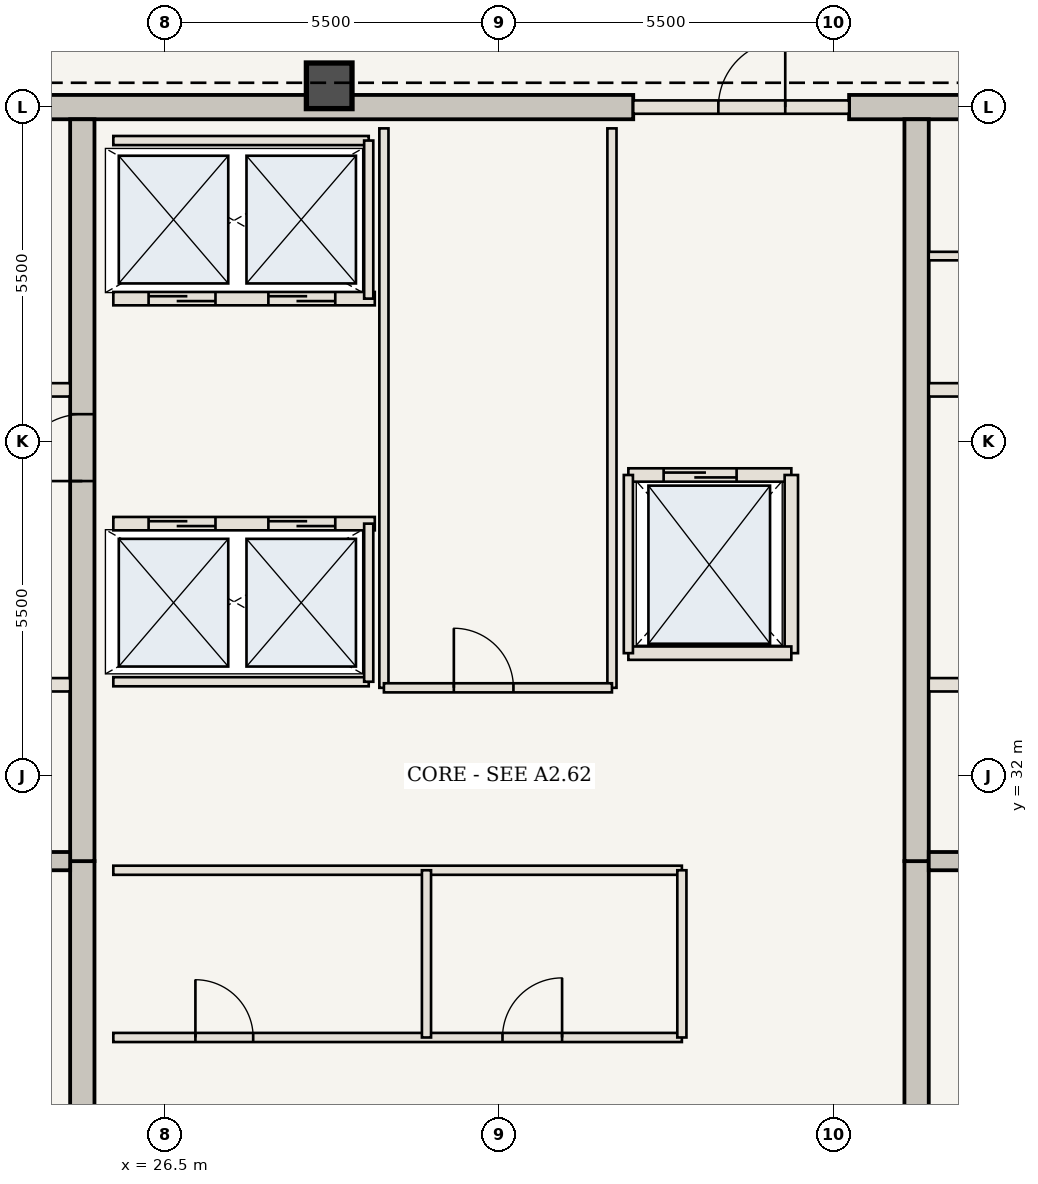
"""IFC4 building model, lengths in metres.
Left out: names, types, materials, properties, quantities, classifications, styles, units other than length and angle.
Written with IfcOpenShell. Run it as: python <this file> out.ifc"""

import sys

from ifc_helpers import new_model, si_unit, direction, frame, frame_2d, origin, origin_2d, place, context, subcontext, project, spatial, rectangle, extrude, element, fill, save


model = new_model("IFC4")
c1 = context("Model", 3, precision=1e-05, world=origin(), true_north=direction((0.0, 1.0)))
c2 = subcontext(c1, "Body", "Model", "MODEL_VIEW")
j1 = project(units=[si_unit("LENGTHUNIT", "METRE"), si_unit("PLANEANGLEUNIT", "RADIAN")], contexts=[c1])
p1 = place(None, origin())
s1 = spatial("IfcSite", under=j1, at=p1, CompositionType="ELEMENT")
p2 = place(p1, origin())
s2 = spatial("IfcBuilding", under=s1, at=p2, CompositionType="ELEMENT")
p3 = place(p2, frame((0.0, 0.0, 285.25)))
s3 = spatial("IfcBuildingStorey", under=s2, at=p3, CompositionType="ELEMENT", Elevation=285.25)
p4 = place(p3, frame((21.41, 43.0, 0.0), z_axis=(0.0, 0.0, 1.0), x_axis=(1.0, 0.0, 0.0)))
e1 = element("IfcWall", 1, at=p4, inside=s3, PredefinedType="SHEAR", context=c2, shape_type="SweptSolid", body=[
    extrude(rectangle(XDim=12.79, YDim=0.4, at=frame_2d((6.395, 0.0))), origin(), (0.0, 0.0, 1.0), 3.85),
])
p5 = place(p3, frame((37.75, 43.0, 0.0), z_axis=(0.0, 0.0, 1.0), x_axis=(1.0, 0.0, 0.0)))
e2 = element("IfcWall", 2, at=p5, inside=s3, PredefinedType="SHEAR", context=c2, shape_type="SweptSolid", body=[
    extrude(rectangle(XDim=4.84, YDim=0.4, at=frame_2d((2.42, 0.0))), origin(), (0.0, 0.0, 1.0), 3.85),
])
p6 = place(p3, frame((25.14, 21.15, 0.0), z_axis=(0.0, 0.0, 1.0), x_axis=(0.0, 1.0, 0.0)))
e3 = element("IfcWall", 3, at=p6, inside=s3, PredefinedType="SHEAR", context=c2, shape_type="SweptSolid", body=[
    extrude(rectangle(XDim=9.45, YDim=0.4, at=frame_2d((4.725, 0.0))), origin(), (0.0, 0.0, 1.0), 3.85),
])
p7 = place(p3, frame((25.14, 30.6, 0.0), z_axis=(0.0, 0.0, 1.0), x_axis=(0.0, 1.0, 0.0)))
e4 = element("IfcWall", 4, at=p7, inside=s3, PredefinedType="SHEAR", context=c2, shape_type="SweptSolid", body=[
    extrude(rectangle(XDim=12.2, YDim=0.4, at=frame_2d((6.1, 0.0))), origin(), (0.0, 0.0, 1.0), 3.85),
])
p8 = place(p7, frame((6.25, 0.0, 0.0)))
e5 = element("IfcOpeningElement", 5, at=p8, cuts=e4, PredefinedType="OPENING", context=c2, shape_type="SweptSolid", body=[
    extrude(rectangle(XDim=1.1, YDim=2.15, at=frame_2d((0.55, 1.075))), frame((0.0, 0.21, 0.0), z_axis=(0.0, -1.0, 0.0), x_axis=(1.0, 0.0, 0.0)), (0.0, 0.0, 1.0), 0.42),
])
p9 = place(p3, frame((38.86, 21.15, 0.0), z_axis=(0.0, 0.0, 1.0), x_axis=(0.0, 1.0, 0.0)))
e6 = element("IfcWall", 6, at=p9, inside=s3, PredefinedType="SHEAR", context=c2, shape_type="SweptSolid", body=[
    extrude(rectangle(XDim=9.45, YDim=0.4, at=frame_2d((4.725, 0.0))), origin(), (0.0, 0.0, 1.0), 3.85),
])
p10 = place(p3, frame((38.86, 30.6, 0.0), z_axis=(0.0, 0.0, 1.0), x_axis=(0.0, 1.0, 0.0)))
e7 = element("IfcWall", 7, at=p10, inside=s3, PredefinedType="SHEAR", context=c2, shape_type="SweptSolid", body=[
    extrude(rectangle(XDim=12.2, YDim=0.4, at=frame_2d((6.1, 0.0))), origin(), (0.0, 0.0, 1.0), 3.85),
])
p11 = place(p3, frame((29.2, 43.35, 0.0), z_axis=(0.0, 0.0, 1.0), x_axis=(1.0, 0.0, 0.0)))
e8 = element("IfcColumn", 8, at=p11, inside=s3, PredefinedType="COLUMN", context=c2, shape_type="SweptSolid", body=[
    extrude(rectangle(XDim=0.75, YDim=0.75, at=origin_2d()), origin(), (0.0, 0.0, 1.0), 3.85),
])
for number, where, z_axis, x_axis in (
    (9, (21.41, 30.6, 0.0), (0.0, 0.0, 1.0), (1.0, 0.0, 0.0)),
    (10, (39.06, 30.6, 0.0), (0.0, 0.0, 1.0), (1.0, 0.0, 0.0)),
):
    element("IfcWall", number, at=place(p3, frame(where, z_axis=z_axis, x_axis=x_axis)), inside=s3, PredefinedType="SHEAR", context=c2, shape_type="SweptSolid", body=[
        extrude(rectangle(XDim=3.53, YDim=0.3, at=frame_2d((1.765, 0.0))), origin(), (0.0, 0.0, 1.0), 3.685),
    ])
p12 = place(p3, frame((21.41, 33.5, 0.0), z_axis=(0.0, 0.0, 1.0), x_axis=(1.0, 0.0, 0.0)))
e11 = element("IfcWall", 11, at=p12, inside=s3, PredefinedType="STANDARD", context=c2, shape_type="SweptSolid", body=[
    extrude(rectangle(XDim=3.53, YDim=0.22, at=frame_2d((1.765, 0.0))), origin(), (0.0, 0.0, 1.0), 3.685),
])
p13 = place(p12, frame((0.75, 0.0, 0.0)))
e12 = element("IfcOpeningElement", 12, at=p13, cuts=e11, PredefinedType="OPENING", context=c2, shape_type="SweptSolid", body=[
    extrude(rectangle(XDim=1.2, YDim=2.2, at=frame_2d((0.6, 1.1))), frame((0.0, 0.12, 0.0), z_axis=(0.0, -1.0, 0.0), x_axis=(1.0, 0.0, 0.0)), (0.0, 0.0, 1.0), 0.24),
])
p14 = place(p3, frame((39.06, 33.5, 0.0), z_axis=(0.0, 0.0, 1.0), x_axis=(1.0, 0.0, 0.0)))
e13 = element("IfcWall", 13, at=p14, inside=s3, PredefinedType="STANDARD", context=c2, shape_type="SweptSolid", body=[
    extrude(rectangle(XDim=3.53, YDim=0.22, at=frame_2d((1.765, 0.0))), origin(), (0.0, 0.0, 1.0), 3.685),
])
p15 = place(p14, frame((1.55, 0.0, 0.0)))
e14 = element("IfcOpeningElement", 14, at=p15, cuts=e13, PredefinedType="OPENING", context=c2, shape_type="SweptSolid", body=[
    extrude(rectangle(XDim=1.2, YDim=2.2, at=frame_2d((0.6, 1.1))), frame((0.0, 0.12, 0.0), z_axis=(0.0, -1.0, 0.0), x_axis=(1.0, 0.0, 0.0)), (0.0, 0.0, 1.0), 0.24),
])
for number, where, z_axis, x_axis in (
    (15, (21.41, 38.35, 0.0), (0.0, 0.0, 1.0), (1.0, 0.0, 0.0)),
    (16, (39.06, 38.35, 0.0), (0.0, 0.0, 1.0), (1.0, 0.0, 0.0)),
):
    element("IfcWall", number, at=place(p3, frame(where, z_axis=z_axis, x_axis=x_axis)), inside=s3, PredefinedType="STANDARD", context=c2, shape_type="SweptSolid", body=[
        extrude(rectangle(XDim=3.53, YDim=0.22, at=frame_2d((1.765, 0.0))), origin(), (0.0, 0.0, 1.0), 3.685),
    ])
p16 = place(p3, frame((39.06, 40.55, 0.0), z_axis=(0.0, 0.0, 1.0), x_axis=(1.0, 0.0, 0.0)))
e17 = element("IfcWall", 17, at=p16, inside=s3, PredefinedType="STANDARD", context=c2, shape_type="SweptSolid", body=[
    extrude(rectangle(XDim=3.53, YDim=0.14, at=frame_2d((1.765, 0.0))), origin(), (0.0, 0.0, 1.0), 3.685),
])
p17 = place(p3, frame((25.65, 27.7, 0.0), z_axis=(0.0, 0.0, 1.0), x_axis=(1.0, 0.0, 0.0)))
e18 = element("IfcWall", 18, at=p17, inside=s3, PredefinedType="STANDARD", context=c2, shape_type="SweptSolid", body=[
    extrude(rectangle(XDim=9.35, YDim=0.15, at=frame_2d((4.675, 0.0))), origin(), (0.0, 0.0, 1.0), 3.685),
])
p18 = place(p17, frame((1.35, 0.0, 0.0)))
e19 = element("IfcOpeningElement", 19, at=p18, cuts=e18, PredefinedType="OPENING", context=c2, shape_type="SweptSolid", body=[
    extrude(rectangle(XDim=0.95, YDim=2.15, at=frame_2d((0.475, 1.075))), frame((0.0, 0.085, 0.0), z_axis=(0.0, -1.0, 0.0), x_axis=(1.0, 0.0, 0.0)), (0.0, 0.0, 1.0), 0.17),
])
p19 = place(p17, frame((6.4, 0.0, 0.0)))
e20 = element("IfcOpeningElement", 20, at=p19, cuts=e18, PredefinedType="OPENING", context=c2, shape_type="SweptSolid", body=[
    extrude(rectangle(XDim=0.98, YDim=2.2, at=frame_2d((0.49, 1.1))), frame((0.0, 0.085, 0.0), z_axis=(0.0, -1.0, 0.0), x_axis=(1.0, 0.0, 0.0)), (0.0, 0.0, 1.0), 0.17),
])
p20 = place(p3, frame((25.65, 30.45, 0.0), z_axis=(0.0, 0.0, 1.0), x_axis=(1.0, 0.0, 0.0)))
e21 = element("IfcWall", 21, at=p20, inside=s3, PredefinedType="STANDARD", context=c2, shape_type="SweptSolid", body=[
    extrude(rectangle(XDim=9.35, YDim=0.15, at=frame_2d((4.675, 0.0))), origin(), (0.0, 0.0, 1.0), 3.685),
])
for number, where, z_axis, x_axis in (
    (22, (30.8, 27.7, 0.0), (0.0, 0.0, 1.0), (0.0, 1.0, 0.0)),
    (23, (35.0, 27.7, 0.0), (0.0, 0.0, 1.0), (0.0, 1.0, 0.0)),
):
    element("IfcWall", number, at=place(p3, frame(where, z_axis=z_axis, x_axis=x_axis)), inside=s3, PredefinedType="STANDARD", context=c2, shape_type="SweptSolid", body=[
        extrude(rectangle(XDim=2.75, YDim=0.15, at=frame_2d((1.375, 0.0))), origin(), (0.0, 0.0, 1.0), 3.685),
    ])
p21 = place(p3, frame((25.65, 36.15, 0.0), z_axis=(0.0, 0.0, 1.0), x_axis=(1.0, 0.0, 0.0)))
e24 = element("IfcWall", 24, at=p21, inside=s3, PredefinedType="STANDARD", context=c2, shape_type="SweptSolid", body=[
    extrude(rectangle(XDim=4.3, YDim=0.22, at=frame_2d((2.15, 0.0))), origin(), (0.0, 0.0, 1.0), 3.685),
])
p22 = place(p21, frame((0.58, 0.0, 0.0)))
e25 = element("IfcOpeningElement", 25, at=p22, cuts=e24, PredefinedType="OPENING", context=c2, shape_type="SweptSolid", body=[
    extrude(rectangle(XDim=1.1, YDim=2.15, at=frame_2d((0.55, 1.075))), frame((0.0, 0.12, 0.0), z_axis=(0.0, -1.0, 0.0), x_axis=(1.0, 0.0, 0.0)), (0.0, 0.0, 1.0), 0.24),
])
p23 = place(p21, frame((2.55, 0.0, 0.0)))
e26 = element("IfcOpeningElement", 26, at=p23, cuts=e24, PredefinedType="OPENING", context=c2, shape_type="SweptSolid", body=[
    extrude(rectangle(XDim=1.1, YDim=2.15, at=frame_2d((0.55, 1.075))), frame((0.0, 0.12, 0.0), z_axis=(0.0, -1.0, 0.0), x_axis=(1.0, 0.0, 0.0)), (0.0, 0.0, 1.0), 0.24),
])
p24 = place(p3, frame((25.65, 33.55, 0.0), z_axis=(0.0, 0.0, 1.0), x_axis=(1.0, 0.0, 0.0)))
e27 = element("IfcWall", 27, at=p24, inside=s3, PredefinedType="STANDARD", context=c2, shape_type="SweptSolid", body=[
    extrude(rectangle(XDim=4.2, YDim=0.15, at=frame_2d((2.1, 0.0))), origin(), (0.0, 0.0, 1.0), 3.685),
])
p25 = place(p3, frame((29.85, 33.55, 0.0), z_axis=(0.0, 0.0, 1.0), x_axis=(0.0, 1.0, 0.0)))
e28 = element("IfcWall", 28, at=p25, inside=s3, PredefinedType="STANDARD", context=c2, shape_type="SweptSolid", body=[
    extrude(rectangle(XDim=2.6, YDim=0.15, at=frame_2d((1.3, 0.0))), origin(), (0.0, 0.0, 1.0), 3.685),
])
p26 = place(p3, frame((25.65, 39.85, 0.0), z_axis=(0.0, 0.0, 1.0), x_axis=(1.0, 0.0, 0.0)))
e29 = element("IfcWall", 29, at=p26, inside=s3, PredefinedType="STANDARD", context=c2, shape_type="SweptSolid", body=[
    extrude(rectangle(XDim=4.3, YDim=0.22, at=frame_2d((2.15, 0.0))), origin(), (0.0, 0.0, 1.0), 3.685),
])
p27 = place(p26, frame((0.58, 0.0, 0.0)))
e30 = element("IfcOpeningElement", 30, at=p27, cuts=e29, PredefinedType="OPENING", context=c2, shape_type="SweptSolid", body=[
    extrude(rectangle(XDim=1.1, YDim=2.15, at=frame_2d((0.55, 1.075))), frame((0.0, 0.12, 0.0), z_axis=(0.0, -1.0, 0.0), x_axis=(1.0, 0.0, 0.0)), (0.0, 0.0, 1.0), 0.24),
])
p28 = place(p26, frame((2.55, 0.0, 0.0)))
e31 = element("IfcOpeningElement", 31, at=p28, cuts=e29, PredefinedType="OPENING", context=c2, shape_type="SweptSolid", body=[
    extrude(rectangle(XDim=1.1, YDim=2.15, at=frame_2d((0.55, 1.075))), frame((0.0, 0.12, 0.0), z_axis=(0.0, -1.0, 0.0), x_axis=(1.0, 0.0, 0.0)), (0.0, 0.0, 1.0), 0.24),
])
p29 = place(p3, frame((25.65, 42.45, 0.0), z_axis=(0.0, 0.0, 1.0), x_axis=(1.0, 0.0, 0.0)))
e32 = element("IfcWall", 32, at=p29, inside=s3, PredefinedType="STANDARD", context=c2, shape_type="SweptSolid", body=[
    extrude(rectangle(XDim=4.2, YDim=0.15, at=frame_2d((2.1, 0.0))), origin(), (0.0, 0.0, 1.0), 3.685),
])
p30 = place(p3, frame((29.85, 39.85, 0.0), z_axis=(0.0, 0.0, 1.0), x_axis=(0.0, 1.0, 0.0)))
e33 = element("IfcWall", 33, at=p30, inside=s3, PredefinedType="STANDARD", context=c2, shape_type="SweptSolid", body=[
    extrude(rectangle(XDim=2.6, YDim=0.15, at=frame_2d((1.3, 0.0))), origin(), (0.0, 0.0, 1.0), 3.685),
])
for number, where, z_axis, x_axis in (
    (34, (30.1, 33.45, 0.0), (0.0, 0.0, 1.0), (0.0, 1.0, 0.0)),
    (35, (33.85, 33.45, 0.0), (0.0, 0.0, 1.0), (0.0, 1.0, 0.0)),
):
    element("IfcWall", number, at=place(p3, frame(where, z_axis=z_axis, x_axis=x_axis)), inside=s3, PredefinedType="STANDARD", context=c2, shape_type="SweptSolid", body=[
        extrude(rectangle(XDim=9.2, YDim=0.15, at=frame_2d((4.6, 0.0))), origin(), (0.0, 0.0, 1.0), 3.685),
    ])
p31 = place(p3, frame((30.1, 33.45, 0.0), z_axis=(0.0, 0.0, 1.0), x_axis=(1.0, 0.0, 0.0)))
e36 = element("IfcWall", 36, at=p31, inside=s3, PredefinedType="STANDARD", context=c2, shape_type="SweptSolid", body=[
    extrude(rectangle(XDim=3.75, YDim=0.15, at=frame_2d((1.875, 0.0))), origin(), (0.0, 0.0, 1.0), 3.685),
])
p32 = place(p31, frame((1.15, 0.0, 0.0)))
e37 = element("IfcOpeningElement", 37, at=p32, cuts=e36, PredefinedType="OPENING", context=c2, shape_type="SweptSolid", body=[
    extrude(rectangle(XDim=0.98, YDim=2.2, at=frame_2d((0.49, 1.1))), frame((0.0, 0.085, 0.0), z_axis=(0.0, -1.0, 0.0), x_axis=(1.0, 0.0, 0.0)), (0.0, 0.0, 1.0), 0.17),
])
p33 = place(p3, frame((34.2, 43.0, 0.0), z_axis=(0.0, 0.0, 1.0), x_axis=(1.0, 0.0, 0.0)))
e38 = element("IfcWall", 38, at=p33, inside=s3, PredefinedType="STANDARD", context=c2, shape_type="SweptSolid", body=[
    extrude(rectangle(XDim=3.55, YDim=0.22, at=frame_2d((1.775, 0.0))), origin(), (0.0, 0.0, 1.0), 3.685),
])
p34 = place(p33, frame((1.4, 0.0, 0.0)))
e39 = element("IfcOpeningElement", 39, at=p34, cuts=e38, PredefinedType="OPENING", context=c2, shape_type="SweptSolid", body=[
    extrude(rectangle(XDim=1.1, YDim=2.15, at=frame_2d((0.55, 1.075))), frame((0.0, 0.12, 0.0), z_axis=(0.0, -1.0, 0.0), x_axis=(1.0, 0.0, 0.0)), (0.0, 0.0, 1.0), 0.24),
])
p35 = place(p3, frame((34.12, 36.95, 0.0), z_axis=(0.0, 0.0, 1.0), x_axis=(1.0, 0.0, 0.0)))
e40 = element("IfcWall", 40, at=p35, inside=s3, PredefinedType="STANDARD", context=c2, shape_type="SweptSolid", body=[
    extrude(rectangle(XDim=2.68, YDim=0.22, at=frame_2d((1.34, 0.0))), origin(), (0.0, 0.0, 1.0), 3.685),
])
p36 = place(p35, frame((0.58, 0.0, 0.0)))
e41 = element("IfcOpeningElement", 41, at=p36, cuts=e40, PredefinedType="OPENING", context=c2, shape_type="SweptSolid", body=[
    extrude(rectangle(XDim=1.2, YDim=2.2, at=frame_2d((0.6, 1.1))), frame((0.0, 0.12, 0.0), z_axis=(0.0, -1.0, 0.0), x_axis=(1.0, 0.0, 0.0)), (0.0, 0.0, 1.0), 0.24),
])
p37 = place(p3, frame((36.8, 34.02, 0.0), z_axis=(0.0, 0.0, 1.0), x_axis=(0.0, 1.0, 0.0)))
e42 = element("IfcWall", 42, at=p37, inside=s3, PredefinedType="STANDARD", context=c2, shape_type="SweptSolid", body=[
    extrude(rectangle(XDim=2.93, YDim=0.22, at=frame_2d((1.465, 0.0))), origin(), (0.0, 0.0, 1.0), 3.685),
])
p38 = place(p3, frame((34.12, 34.02, 0.0), z_axis=(0.0, 0.0, 1.0), x_axis=(1.0, 0.0, 0.0)))
e43 = element("IfcWall", 43, at=p38, inside=s3, PredefinedType="STANDARD", context=c2, shape_type="SweptSolid", body=[
    extrude(rectangle(XDim=2.68, YDim=0.22, at=frame_2d((1.34, 0.0))), origin(), (0.0, 0.0, 1.0), 3.685),
])
p39 = place(p3, frame((34.12, 34.02, 0.0), z_axis=(0.0, 0.0, 1.0), x_axis=(0.0, 1.0, 0.0)))
e44 = element("IfcWall", 44, at=p39, inside=s3, PredefinedType="STANDARD", context=c2, shape_type="SweptSolid", body=[
    extrude(rectangle(XDim=2.93, YDim=0.15, at=frame_2d((1.465, 0.0))), origin(), (0.0, 0.0, 1.0), 3.685),
])
p40 = place(p8, origin())
e45 = element("IfcDoor", 45, at=p40, inside=s3, OperationType="SINGLE_SWING_LEFT", PredefinedType="DOOR", context=c2, shape_type="SweptSolid", body=[
    extrude(rectangle(XDim=1.1, YDim=2.15, at=frame_2d((0.55, 1.075))), frame((0.0, 0.025, 0.0), z_axis=(0.0, -1.0, 0.0), x_axis=(1.0, 0.0, 0.0)), (0.0, 0.0, 1.0), 0.05),
])
fill(e5, e45)
p41 = place(p18, origin())
e46 = element("IfcDoor", 46, at=p41, inside=s3, OperationType="SINGLE_SWING_LEFT", PredefinedType="DOOR", context=c2, shape_type="SweptSolid", body=[
    extrude(rectangle(XDim=0.95, YDim=2.15, at=frame_2d((0.475, 1.075))), frame((0.0, 0.025, 0.0), z_axis=(0.0, -1.0, 0.0), x_axis=(1.0, 0.0, 0.0)), (0.0, 0.0, 1.0), 0.05),
])
fill(e19, e46)
p42 = place(p19, origin())
e47 = element("IfcDoor", 47, at=p42, inside=s3, OperationType="SINGLE_SWING_RIGHT", PredefinedType="DOOR", context=c2, shape_type="SweptSolid", body=[
    extrude(rectangle(XDim=0.98, YDim=2.2, at=frame_2d((0.49, 1.1))), frame((0.0, 0.025, 0.0), z_axis=(0.0, -1.0, 0.0), x_axis=(1.0, 0.0, 0.0)), (0.0, 0.0, 1.0), 0.05),
])
fill(e20, e47)
p43 = place(p22, origin())
e48 = element("IfcDoor", 48, at=p43, inside=s3, OperationType="DOUBLE_DOOR_SLIDING", PredefinedType="DOOR", context=c2, shape_type="SweptSolid", body=[
    extrude(rectangle(XDim=1.1, YDim=2.15, at=frame_2d((0.55, 1.075))), frame((0.0, 0.025, 0.0), z_axis=(0.0, -1.0, 0.0), x_axis=(1.0, 0.0, 0.0)), (0.0, 0.0, 1.0), 0.05),
])
fill(e25, e48)
p44 = place(p23, origin())
e49 = element("IfcDoor", 49, at=p44, inside=s3, OperationType="DOUBLE_DOOR_SLIDING", PredefinedType="DOOR", context=c2, shape_type="SweptSolid", body=[
    extrude(rectangle(XDim=1.1, YDim=2.15, at=frame_2d((0.55, 1.075))), frame((0.0, 0.025, 0.0), z_axis=(0.0, -1.0, 0.0), x_axis=(1.0, 0.0, 0.0)), (0.0, 0.0, 1.0), 0.05),
])
fill(e26, e49)
p45 = place(p27, origin())
e50 = element("IfcDoor", 50, at=p45, inside=s3, OperationType="DOUBLE_DOOR_SLIDING", PredefinedType="DOOR", context=c2, shape_type="SweptSolid", body=[
    extrude(rectangle(XDim=1.1, YDim=2.15, at=frame_2d((0.55, 1.075))), frame((0.0, 0.025, 0.0), z_axis=(0.0, -1.0, 0.0), x_axis=(1.0, 0.0, 0.0)), (0.0, 0.0, 1.0), 0.05),
])
fill(e30, e50)
p46 = place(p28, origin())
e51 = element("IfcDoor", 51, at=p46, inside=s3, OperationType="DOUBLE_DOOR_SLIDING", PredefinedType="DOOR", context=c2, shape_type="SweptSolid", body=[
    extrude(rectangle(XDim=1.1, YDim=2.15, at=frame_2d((0.55, 1.075))), frame((0.0, 0.025, 0.0), z_axis=(0.0, -1.0, 0.0), x_axis=(1.0, 0.0, 0.0)), (0.0, 0.0, 1.0), 0.05),
])
fill(e31, e51)
p47 = place(p32, origin())
e52 = element("IfcDoor", 52, at=p47, inside=s3, OperationType="SINGLE_SWING_LEFT", PredefinedType="DOOR", context=c2, shape_type="SweptSolid", body=[
    extrude(rectangle(XDim=0.98, YDim=2.2, at=frame_2d((0.49, 1.1))), frame((0.0, 0.025, 0.0), z_axis=(0.0, -1.0, 0.0), x_axis=(1.0, 0.0, 0.0)), (0.0, 0.0, 1.0), 0.05),
])
fill(e37, e52)
p48 = place(p34, origin())
e53 = element("IfcDoor", 53, at=p48, inside=s3, OperationType="SINGLE_SWING_RIGHT", PredefinedType="DOOR", context=c2, shape_type="SweptSolid", body=[
    extrude(rectangle(XDim=1.1, YDim=2.15, at=frame_2d((0.55, 1.075))), frame((0.0, 0.025, 0.0), z_axis=(0.0, -1.0, 0.0), x_axis=(1.0, 0.0, 0.0)), (0.0, 0.0, 1.0), 0.05),
])
fill(e39, e53)
p49 = place(p36, origin())
e54 = element("IfcDoor", 54, at=p49, inside=s3, OperationType="DOUBLE_DOOR_SLIDING", PredefinedType="DOOR", context=c2, shape_type="SweptSolid", body=[
    extrude(rectangle(XDim=1.2, YDim=2.2, at=frame_2d((0.6, 1.1))), frame((0.0, 0.025, 0.0), z_axis=(0.0, -1.0, 0.0), x_axis=(1.0, 0.0, 0.0)), (0.0, 0.0, 1.0), 0.05),
])
fill(e41, e54)
save(model, sys.argv[1])
